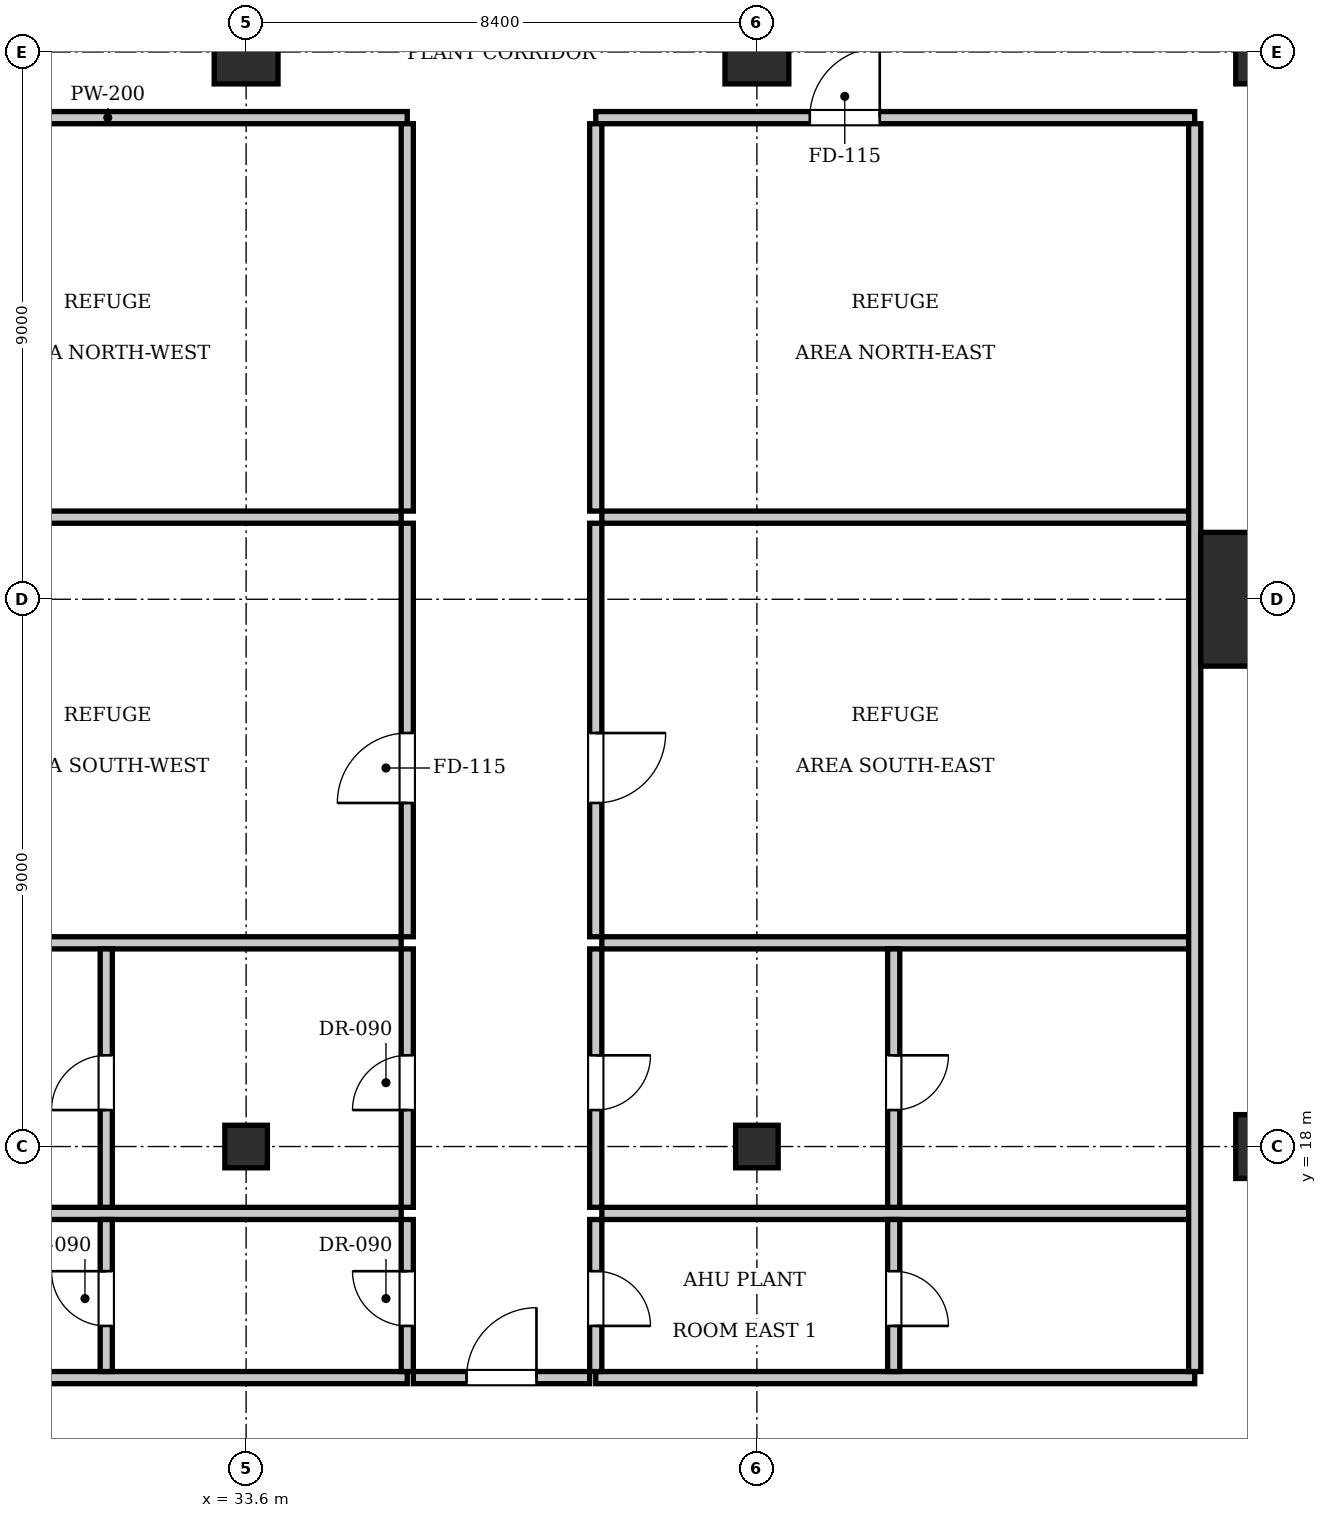
"""IFC4 building model, lengths in metres.
Left out: names, types, materials, properties, quantities, classifications, styles, units other than length and angle.
Written with IfcOpenShell. Run it as: python <this file> out.ifc"""

import sys

from ifc_helpers import new_model, si_unit, direction, frame, frame_2d, origin, origin_2d, place, context, subcontext, project, spatial, rectangle, i_section, extrude, element, fill, save


model = new_model("IFC4")
c1 = context("Model", 3, precision=1e-05, world=origin(), true_north=direction((0.0, 1.0)))
c2 = subcontext(c1, "Body", "Model", "MODEL_VIEW")
j1 = project(units=[si_unit("LENGTHUNIT", "METRE"), si_unit("PLANEANGLEUNIT", "RADIAN")], contexts=[c1])
p1 = place(None, origin())
s1 = spatial("IfcSite", under=j1, at=p1, CompositionType="ELEMENT")
p2 = place(p1, origin())
s2 = spatial("IfcBuilding", under=s1, at=p2, CompositionType="ELEMENT")
p3 = place(p2, frame((0.0, 0.0, 115.5)))
s3 = spatial("IfcBuildingStorey", under=s2, at=p3, CompositionType="ELEMENT", Elevation=115.5)
p4 = place(p3, frame((50.4, 27.0, 0.0), z_axis=(0.0, 0.0, 1.0), x_axis=(1.0, 0.0, 0.0)))
e1 = element("IfcColumn", 1, at=p4, inside=s3, PredefinedType="COLUMN", context=c2, shape_type="SweptSolid", body=[
    extrude(rectangle(XDim=2.2, YDim=2.2, at=origin_2d()), origin(), (0.0, 0.0, 1.0), 7.0),
])
for number, where, z_axis, x_axis in (
    (2, (33.6, 36.0, 0.0), (0.0, 0.0, 1.0), (1.0, 0.0, 0.0)),
    (3, (42.0, 36.0, 0.0), (0.0, 0.0, 1.0), (1.0, 0.0, 0.0)),
    (4, (50.4, 36.0, 0.0), (0.0, 0.0, 1.0), (1.0, 0.0, 0.0)),
    (5, (50.4, 18.0, 0.0), (0.0, 0.0, 1.0), (1.0, 0.0, 0.0)),
):
    element("IfcColumn", number, at=place(p3, frame(where, z_axis=z_axis, x_axis=x_axis)), inside=s3, PredefinedType="COLUMN", context=c2, shape_type="SweptSolid", body=[
        extrude(rectangle(XDim=1.05, YDim=1.05, at=origin_2d()), origin(), (0.0, 0.0, 1.0), 7.0),
    ])
for number, where, z_axis, x_axis in (
    (6, (33.6, 18.0, 0.0), (0.0, 0.0, 1.0), (1.0, 0.0, 0.0)),
    (7, (42.0, 18.0, 0.0), (0.0, 0.0, 1.0), (1.0, 0.0, 0.0)),
):
    element("IfcColumn", number, at=place(p3, frame(where, z_axis=z_axis, x_axis=x_axis)), inside=s3, PredefinedType="COLUMN", context=c2, shape_type="SweptSolid", body=[
        extrude(i_section(OverallWidth=0.7, OverallDepth=0.7, WebThickness=0.028, FlangeThickness=0.044, at=origin_2d()), origin(), (0.0, 0.0, 1.0), 7.0),
    ])
p5 = place(p3, frame((26.4, 34.92, 0.0), z_axis=(0.0, 0.0, 1.0), x_axis=(1.0, 0.0, 0.0)))
e8 = element("IfcWall", 8, at=p5, inside=s3, PredefinedType="PARTITIONING", context=c2, shape_type="SweptSolid", body=[
    extrude(rectangle(XDim=9.85, YDim=0.2, at=frame_2d((4.925, 0.0))), origin(), (0.0, 0.0, 1.0), 6.76),
])
p6 = place(p5, frame((2.2, 0.0, 0.0)))
e9 = element("IfcOpeningElement", 9, at=p6, cuts=e8, PredefinedType="OPENING", context=c2, shape_type="SweptSolid", body=[
    extrude(rectangle(XDim=1.15, YDim=2.15, at=frame_2d((0.575, 1.075))), frame((0.0, 0.11, 0.0), z_axis=(0.0, -1.0, 0.0), x_axis=(1.0, 0.0, 0.0)), (0.0, 0.0, 1.0), 0.22),
])
for number, where, z_axis, x_axis in (
    (10, (26.5, 28.35, 0.0), (0.0, 0.0, 1.0), (1.0, 0.0, 0.0)),
    (11, (26.5, 21.35, 0.0), (0.0, 0.0, 1.0), (1.0, 0.0, 0.0)),
    (12, (26.5, 16.9, 0.0), (0.0, 0.0, 1.0), (1.0, 0.0, 0.0)),
):
    element("IfcWall", number, at=place(p3, frame(where, z_axis=z_axis, x_axis=x_axis)), inside=s3, PredefinedType="PARTITIONING", context=c2, shape_type="SweptSolid", body=[
        extrude(rectangle(XDim=9.65, YDim=0.2, at=frame_2d((4.825, 0.0))), origin(), (0.0, 0.0, 1.0), 6.76),
    ])
p7 = place(p3, frame((26.4, 14.2, 0.0), z_axis=(0.0, 0.0, 1.0), x_axis=(1.0, 0.0, 0.0)))
e13 = element("IfcWall", 13, at=p7, inside=s3, PredefinedType="PARTITIONING", context=c2, shape_type="SweptSolid", body=[
    extrude(rectangle(XDim=9.85, YDim=0.2, at=frame_2d((4.925, 0.0))), origin(), (0.0, 0.0, 1.0), 6.76),
])
p8 = place(p3, frame((36.25, 28.45, 0.0), z_axis=(0.0, 0.0, 1.0), x_axis=(0.0, 1.0, 0.0)))
e14 = element("IfcWall", 14, at=p8, inside=s3, PredefinedType="PARTITIONING", context=c2, shape_type="SweptSolid", body=[
    extrude(rectangle(XDim=6.37, YDim=0.2, at=frame_2d((3.185, 0.0))), origin(), (0.0, 0.0, 1.0), 6.76),
])
p9 = place(p3, frame((36.25, 21.45, 0.0), z_axis=(0.0, 0.0, 1.0), x_axis=(0.0, 1.0, 0.0)))
e15 = element("IfcWall", 15, at=p9, inside=s3, PredefinedType="PARTITIONING", context=c2, shape_type="SweptSolid", body=[
    extrude(rectangle(XDim=6.8, YDim=0.2, at=frame_2d((3.4, 0.0))), origin(), (0.0, 0.0, 1.0), 6.76),
])
p10 = place(p9, frame((2.2, 0.0, 0.0)))
e16 = element("IfcOpeningElement", 16, at=p10, cuts=e15, PredefinedType="OPENING", context=c2, shape_type="SweptSolid", body=[
    extrude(rectangle(XDim=1.15, YDim=2.15, at=frame_2d((0.575, 1.075))), frame((0.0, 0.11, 0.0), z_axis=(0.0, -1.0, 0.0), x_axis=(1.0, 0.0, 0.0)), (0.0, 0.0, 1.0), 0.22),
])
p11 = place(p3, frame((36.25, 17.0, 0.0), z_axis=(0.0, 0.0, 1.0), x_axis=(0.0, 1.0, 0.0)))
e17 = element("IfcWall", 17, at=p11, inside=s3, PredefinedType="PARTITIONING", context=c2, shape_type="SweptSolid", body=[
    extrude(rectangle(XDim=4.25, YDim=0.2, at=frame_2d((2.125, 0.0))), origin(), (0.0, 0.0, 1.0), 6.76),
])
p12 = place(p11, frame((1.6, 0.0, 0.0)))
e18 = element("IfcOpeningElement", 18, at=p12, cuts=e17, PredefinedType="OPENING", context=c2, shape_type="SweptSolid", body=[
    extrude(rectangle(XDim=0.9, YDim=2.1, at=frame_2d((0.45, 1.05))), frame((0.0, 0.11, 0.0), z_axis=(0.0, -1.0, 0.0), x_axis=(1.0, 0.0, 0.0)), (0.0, 0.0, 1.0), 0.22),
])
p13 = place(p3, frame((36.25, 14.3, 0.0), z_axis=(0.0, 0.0, 1.0), x_axis=(0.0, 1.0, 0.0)))
e19 = element("IfcWall", 19, at=p13, inside=s3, PredefinedType="PARTITIONING", context=c2, shape_type="SweptSolid", body=[
    extrude(rectangle(XDim=2.5, YDim=0.2, at=frame_2d((1.25, 0.0))), origin(), (0.0, 0.0, 1.0), 6.76),
])
p14 = place(p13, frame((0.75, 0.0, 0.0)))
e20 = element("IfcOpeningElement", 20, at=p14, cuts=e19, PredefinedType="OPENING", context=c2, shape_type="SweptSolid", body=[
    extrude(rectangle(XDim=0.9, YDim=2.1, at=frame_2d((0.45, 1.05))), frame((0.0, 0.11, 0.0), z_axis=(0.0, -1.0, 0.0), x_axis=(1.0, 0.0, 0.0)), (0.0, 0.0, 1.0), 0.22),
])
p15 = place(p3, frame((31.3, 14.3, 0.0), z_axis=(0.0, 0.0, 1.0), x_axis=(0.0, 1.0, 0.0)))
e21 = element("IfcWall", 21, at=p15, inside=s3, PredefinedType="PARTITIONING", context=c2, shape_type="SweptSolid", body=[
    extrude(rectangle(XDim=2.5, YDim=0.2, at=frame_2d((1.25, 0.0))), origin(), (0.0, 0.0, 1.0), 6.76),
])
p16 = place(p15, frame((0.75, 0.0, 0.0)))
e22 = element("IfcOpeningElement", 22, at=p16, cuts=e21, PredefinedType="OPENING", context=c2, shape_type="SweptSolid", body=[
    extrude(rectangle(XDim=0.9, YDim=2.1, at=frame_2d((0.45, 1.05))), frame((0.0, 0.11, 0.0), z_axis=(0.0, -1.0, 0.0), x_axis=(1.0, 0.0, 0.0)), (0.0, 0.0, 1.0), 0.22),
])
p17 = place(p3, frame((31.3, 17.0, 0.0), z_axis=(0.0, 0.0, 1.0), x_axis=(0.0, 1.0, 0.0)))
e23 = element("IfcWall", 23, at=p17, inside=s3, PredefinedType="PARTITIONING", context=c2, shape_type="SweptSolid", body=[
    extrude(rectangle(XDim=4.25, YDim=0.2, at=frame_2d((2.125, 0.0))), origin(), (0.0, 0.0, 1.0), 6.76),
])
p18 = place(p17, frame((1.6, 0.0, 0.0)))
e24 = element("IfcOpeningElement", 24, at=p18, cuts=e23, PredefinedType="OPENING", context=c2, shape_type="SweptSolid", body=[
    extrude(rectangle(XDim=0.9, YDim=2.1, at=frame_2d((0.45, 1.05))), frame((0.0, 0.11, 0.0), z_axis=(0.0, -1.0, 0.0), x_axis=(1.0, 0.0, 0.0)), (0.0, 0.0, 1.0), 0.22),
])
p19 = place(p3, frame((39.35, 34.92, 0.0), z_axis=(0.0, 0.0, 1.0), x_axis=(1.0, 0.0, 0.0)))
e25 = element("IfcWall", 25, at=p19, inside=s3, PredefinedType="PARTITIONING", context=c2, shape_type="SweptSolid", body=[
    extrude(rectangle(XDim=9.85, YDim=0.2, at=frame_2d((4.925, 0.0))), origin(), (0.0, 0.0, 1.0), 6.76),
])
p20 = place(p19, frame((3.52, 0.0, 0.0)))
e26 = element("IfcOpeningElement", 26, at=p20, cuts=e25, PredefinedType="OPENING", context=c2, shape_type="SweptSolid", body=[
    extrude(rectangle(XDim=1.15, YDim=2.15, at=frame_2d((0.575, 1.075))), frame((0.0, 0.11, 0.0), z_axis=(0.0, -1.0, 0.0), x_axis=(1.0, 0.0, 0.0)), (0.0, 0.0, 1.0), 0.22),
])
for number, where, z_axis, x_axis in (
    (27, (39.45, 28.35, 0.0), (0.0, 0.0, 1.0), (1.0, 0.0, 0.0)),
    (28, (39.45, 21.35, 0.0), (0.0, 0.0, 1.0), (1.0, 0.0, 0.0)),
    (29, (39.45, 16.9, 0.0), (0.0, 0.0, 1.0), (1.0, 0.0, 0.0)),
):
    element("IfcWall", number, at=place(p3, frame(where, z_axis=z_axis, x_axis=x_axis)), inside=s3, PredefinedType="PARTITIONING", context=c2, shape_type="SweptSolid", body=[
        extrude(rectangle(XDim=9.65, YDim=0.2, at=frame_2d((4.825, 0.0))), origin(), (0.0, 0.0, 1.0), 6.76),
    ])
p21 = place(p3, frame((39.35, 14.2, 0.0), z_axis=(0.0, 0.0, 1.0), x_axis=(1.0, 0.0, 0.0)))
e30 = element("IfcWall", 30, at=p21, inside=s3, PredefinedType="PARTITIONING", context=c2, shape_type="SweptSolid", body=[
    extrude(rectangle(XDim=9.85, YDim=0.2, at=frame_2d((4.925, 0.0))), origin(), (0.0, 0.0, 1.0), 6.76),
])
p22 = place(p3, frame((49.2, 14.3, 0.0), z_axis=(0.0, 0.0, 1.0), x_axis=(0.0, 1.0, 0.0)))
e31 = element("IfcWall", 31, at=p22, inside=s3, PredefinedType="PARTITIONING", context=c2, shape_type="SweptSolid", body=[
    extrude(rectangle(XDim=20.52, YDim=0.2, at=frame_2d((10.26, 0.0))), origin(), (0.0, 0.0, 1.0), 6.76),
])
p23 = place(p3, frame((39.35, 28.45, 0.0), z_axis=(0.0, 0.0, 1.0), x_axis=(0.0, 1.0, 0.0)))
e32 = element("IfcWall", 32, at=p23, inside=s3, PredefinedType="PARTITIONING", context=c2, shape_type="SweptSolid", body=[
    extrude(rectangle(XDim=6.37, YDim=0.2, at=frame_2d((3.185, 0.0))), origin(), (0.0, 0.0, 1.0), 6.76),
])
p24 = place(p3, frame((39.35, 21.45, 0.0), z_axis=(0.0, 0.0, 1.0), x_axis=(0.0, 1.0, 0.0)))
e33 = element("IfcWall", 33, at=p24, inside=s3, PredefinedType="PARTITIONING", context=c2, shape_type="SweptSolid", body=[
    extrude(rectangle(XDim=6.8, YDim=0.2, at=frame_2d((3.4, 0.0))), origin(), (0.0, 0.0, 1.0), 6.76),
])
p25 = place(p24, frame((2.2, 0.0, 0.0)))
e34 = element("IfcOpeningElement", 34, at=p25, cuts=e33, PredefinedType="OPENING", context=c2, shape_type="SweptSolid", body=[
    extrude(rectangle(XDim=1.15, YDim=2.15, at=frame_2d((0.575, 1.075))), frame((0.0, 0.11, 0.0), z_axis=(0.0, -1.0, 0.0), x_axis=(1.0, 0.0, 0.0)), (0.0, 0.0, 1.0), 0.22),
])
p26 = place(p3, frame((39.35, 17.0, 0.0), z_axis=(0.0, 0.0, 1.0), x_axis=(0.0, 1.0, 0.0)))
e35 = element("IfcWall", 35, at=p26, inside=s3, PredefinedType="PARTITIONING", context=c2, shape_type="SweptSolid", body=[
    extrude(rectangle(XDim=4.25, YDim=0.2, at=frame_2d((2.125, 0.0))), origin(), (0.0, 0.0, 1.0), 6.76),
])
p27 = place(p26, frame((1.6, 0.0, 0.0)))
e36 = element("IfcOpeningElement", 36, at=p27, cuts=e35, PredefinedType="OPENING", context=c2, shape_type="SweptSolid", body=[
    extrude(rectangle(XDim=0.9, YDim=2.1, at=frame_2d((0.45, 1.05))), frame((0.0, 0.11, 0.0), z_axis=(0.0, -1.0, 0.0), x_axis=(1.0, 0.0, 0.0)), (0.0, 0.0, 1.0), 0.22),
])
p28 = place(p3, frame((39.35, 14.3, 0.0), z_axis=(0.0, 0.0, 1.0), x_axis=(0.0, 1.0, 0.0)))
e37 = element("IfcWall", 37, at=p28, inside=s3, PredefinedType="PARTITIONING", context=c2, shape_type="SweptSolid", body=[
    extrude(rectangle(XDim=2.5, YDim=0.2, at=frame_2d((1.25, 0.0))), origin(), (0.0, 0.0, 1.0), 6.76),
])
p29 = place(p28, frame((0.75, 0.0, 0.0)))
e38 = element("IfcOpeningElement", 38, at=p29, cuts=e37, PredefinedType="OPENING", context=c2, shape_type="SweptSolid", body=[
    extrude(rectangle(XDim=0.9, YDim=2.1, at=frame_2d((0.45, 1.05))), frame((0.0, 0.11, 0.0), z_axis=(0.0, -1.0, 0.0), x_axis=(1.0, 0.0, 0.0)), (0.0, 0.0, 1.0), 0.22),
])
p30 = place(p3, frame((44.25, 14.3, 0.0), z_axis=(0.0, 0.0, 1.0), x_axis=(0.0, 1.0, 0.0)))
e39 = element("IfcWall", 39, at=p30, inside=s3, PredefinedType="PARTITIONING", context=c2, shape_type="SweptSolid", body=[
    extrude(rectangle(XDim=2.5, YDim=0.2, at=frame_2d((1.25, 0.0))), origin(), (0.0, 0.0, 1.0), 6.76),
])
p31 = place(p30, frame((0.75, 0.0, 0.0)))
e40 = element("IfcOpeningElement", 40, at=p31, cuts=e39, PredefinedType="OPENING", context=c2, shape_type="SweptSolid", body=[
    extrude(rectangle(XDim=0.9, YDim=2.1, at=frame_2d((0.45, 1.05))), frame((0.0, 0.11, 0.0), z_axis=(0.0, -1.0, 0.0), x_axis=(1.0, 0.0, 0.0)), (0.0, 0.0, 1.0), 0.22),
])
p32 = place(p3, frame((44.25, 17.0, 0.0), z_axis=(0.0, 0.0, 1.0), x_axis=(0.0, 1.0, 0.0)))
e41 = element("IfcWall", 41, at=p32, inside=s3, PredefinedType="PARTITIONING", context=c2, shape_type="SweptSolid", body=[
    extrude(rectangle(XDim=4.25, YDim=0.2, at=frame_2d((2.125, 0.0))), origin(), (0.0, 0.0, 1.0), 6.76),
])
p33 = place(p32, frame((1.6, 0.0, 0.0)))
e42 = element("IfcOpeningElement", 42, at=p33, cuts=e41, PredefinedType="OPENING", context=c2, shape_type="SweptSolid", body=[
    extrude(rectangle(XDim=0.9, YDim=2.1, at=frame_2d((0.45, 1.05))), frame((0.0, 0.11, 0.0), z_axis=(0.0, -1.0, 0.0), x_axis=(1.0, 0.0, 0.0)), (0.0, 0.0, 1.0), 0.22),
])
p34 = place(p3, frame((36.35, 14.2, 0.0), z_axis=(0.0, 0.0, 1.0), x_axis=(1.0, 0.0, 0.0)))
e43 = element("IfcWall", 43, at=p34, inside=s3, PredefinedType="PARTITIONING", context=c2, shape_type="SweptSolid", body=[
    extrude(rectangle(XDim=2.9, YDim=0.2, at=frame_2d((1.45, 0.0))), origin(), (0.0, 0.0, 1.0), 6.76),
])
p35 = place(p34, frame((0.875, 0.0, 0.0)))
e44 = element("IfcOpeningElement", 44, at=p35, cuts=e43, PredefinedType="OPENING", context=c2, shape_type="SweptSolid", body=[
    extrude(rectangle(XDim=1.15, YDim=2.15, at=frame_2d((0.575, 1.075))), frame((0.0, 0.11, 0.0), z_axis=(0.0, -1.0, 0.0), x_axis=(1.0, 0.0, 0.0)), (0.0, 0.0, 1.0), 0.22),
])
p36 = place(p10, origin())
e45 = element("IfcDoor", 45, at=p36, inside=s3, OperationType="SINGLE_SWING_LEFT", PredefinedType="DOOR", context=c2, shape_type="SweptSolid", body=[
    extrude(rectangle(XDim=1.15, YDim=2.15, at=frame_2d((0.575, 1.075))), frame((0.0, 0.025, 0.0), z_axis=(0.0, -1.0, 0.0), x_axis=(1.0, 0.0, 0.0)), (0.0, 0.0, 1.0), 0.05),
])
fill(e16, e45)
p37 = place(p14, origin())
e46 = element("IfcDoor", 46, at=p37, inside=s3, OperationType="SINGLE_SWING_RIGHT", PredefinedType="DOOR", context=c2, shape_type="SweptSolid", body=[
    extrude(rectangle(XDim=0.9, YDim=2.1, at=frame_2d((0.45, 1.05))), frame((0.0, 0.025, 0.0), z_axis=(0.0, -1.0, 0.0), x_axis=(1.0, 0.0, 0.0)), (0.0, 0.0, 1.0), 0.05),
])
fill(e20, e46)
p38 = place(p12, origin())
e47 = element("IfcDoor", 47, at=p38, inside=s3, OperationType="SINGLE_SWING_LEFT", PredefinedType="DOOR", context=c2, shape_type="SweptSolid", body=[
    extrude(rectangle(XDim=0.9, YDim=2.1, at=frame_2d((0.45, 1.05))), frame((0.0, 0.025, 0.0), z_axis=(0.0, -1.0, 0.0), x_axis=(1.0, 0.0, 0.0)), (0.0, 0.0, 1.0), 0.05),
])
fill(e18, e47)
p39 = place(p16, origin())
e48 = element("IfcDoor", 48, at=p39, inside=s3, OperationType="SINGLE_SWING_RIGHT", PredefinedType="DOOR", context=c2, shape_type="SweptSolid", body=[
    extrude(rectangle(XDim=0.9, YDim=2.1, at=frame_2d((0.45, 1.05))), frame((0.0, 0.025, 0.0), z_axis=(0.0, -1.0, 0.0), x_axis=(1.0, 0.0, 0.0)), (0.0, 0.0, 1.0), 0.05),
])
fill(e22, e48)
p40 = place(p18, origin())
e49 = element("IfcDoor", 49, at=p40, inside=s3, OperationType="SINGLE_SWING_LEFT", PredefinedType="DOOR", context=c2, shape_type="SweptSolid", body=[
    extrude(rectangle(XDim=0.9, YDim=2.1, at=frame_2d((0.45, 1.05))), frame((0.0, 0.025, 0.0), z_axis=(0.0, -1.0, 0.0), x_axis=(1.0, 0.0, 0.0)), (0.0, 0.0, 1.0), 0.05),
])
fill(e24, e49)
p41 = place(p20, origin())
e50 = element("IfcDoor", 50, at=p41, inside=s3, OperationType="SINGLE_SWING_RIGHT", PredefinedType="DOOR", context=c2, shape_type="SweptSolid", body=[
    extrude(rectangle(XDim=1.15, YDim=2.15, at=frame_2d((0.575, 1.075))), frame((0.0, 0.025, 0.0), z_axis=(0.0, -1.0, 0.0), x_axis=(1.0, 0.0, 0.0)), (0.0, 0.0, 1.0), 0.05),
])
fill(e26, e50)
p42 = place(p25, frame((1.15, 0.0, 0.0), z_axis=(0.0, 0.0, 1.0), x_axis=(-1.0, 0.0, 0.0)))
e51 = element("IfcDoor", 51, at=p42, inside=s3, OperationType="SINGLE_SWING_LEFT", PredefinedType="DOOR", context=c2, shape_type="SweptSolid", body=[
    extrude(rectangle(XDim=1.15, YDim=2.15, at=frame_2d((0.575, 1.075))), frame((0.0, 0.025, 0.0), z_axis=(0.0, -1.0, 0.0), x_axis=(1.0, 0.0, 0.0)), (0.0, 0.0, 1.0), 0.05),
])
fill(e34, e51)
p43 = place(p29, frame((0.9, 0.0, 0.0), z_axis=(0.0, 0.0, 1.0), x_axis=(-1.0, 0.0, 0.0)))
e52 = element("IfcDoor", 52, at=p43, inside=s3, OperationType="SINGLE_SWING_RIGHT", PredefinedType="DOOR", context=c2, shape_type="SweptSolid", body=[
    extrude(rectangle(XDim=0.9, YDim=2.1, at=frame_2d((0.45, 1.05))), frame((0.0, 0.025, 0.0), z_axis=(0.0, -1.0, 0.0), x_axis=(1.0, 0.0, 0.0)), (0.0, 0.0, 1.0), 0.05),
])
fill(e38, e52)
p44 = place(p27, frame((0.9, 0.0, 0.0), z_axis=(0.0, 0.0, 1.0), x_axis=(-1.0, 0.0, 0.0)))
e53 = element("IfcDoor", 53, at=p44, inside=s3, OperationType="SINGLE_SWING_LEFT", PredefinedType="DOOR", context=c2, shape_type="SweptSolid", body=[
    extrude(rectangle(XDim=0.9, YDim=2.1, at=frame_2d((0.45, 1.05))), frame((0.0, 0.025, 0.0), z_axis=(0.0, -1.0, 0.0), x_axis=(1.0, 0.0, 0.0)), (0.0, 0.0, 1.0), 0.05),
])
fill(e36, e53)
p45 = place(p31, frame((0.9, 0.0, 0.0), z_axis=(0.0, 0.0, 1.0), x_axis=(-1.0, 0.0, 0.0)))
e54 = element("IfcDoor", 54, at=p45, inside=s3, OperationType="SINGLE_SWING_RIGHT", PredefinedType="DOOR", context=c2, shape_type="SweptSolid", body=[
    extrude(rectangle(XDim=0.9, YDim=2.1, at=frame_2d((0.45, 1.05))), frame((0.0, 0.025, 0.0), z_axis=(0.0, -1.0, 0.0), x_axis=(1.0, 0.0, 0.0)), (0.0, 0.0, 1.0), 0.05),
])
fill(e40, e54)
p46 = place(p33, frame((0.9, 0.0, 0.0), z_axis=(0.0, 0.0, 1.0), x_axis=(-1.0, 0.0, 0.0)))
e55 = element("IfcDoor", 55, at=p46, inside=s3, OperationType="SINGLE_SWING_LEFT", PredefinedType="DOOR", context=c2, shape_type="SweptSolid", body=[
    extrude(rectangle(XDim=0.9, YDim=2.1, at=frame_2d((0.45, 1.05))), frame((0.0, 0.025, 0.0), z_axis=(0.0, -1.0, 0.0), x_axis=(1.0, 0.0, 0.0)), (0.0, 0.0, 1.0), 0.05),
])
fill(e42, e55)
p47 = place(p35, origin())
e56 = element("IfcDoor", 56, at=p47, inside=s3, OperationType="SINGLE_SWING_RIGHT", PredefinedType="DOOR", context=c2, shape_type="SweptSolid", body=[
    extrude(rectangle(XDim=1.15, YDim=2.15, at=frame_2d((0.575, 1.075))), frame((0.0, 0.025, 0.0), z_axis=(0.0, -1.0, 0.0), x_axis=(1.0, 0.0, 0.0)), (0.0, 0.0, 1.0), 0.05),
])
fill(e44, e56)
save(model, sys.argv[1])
